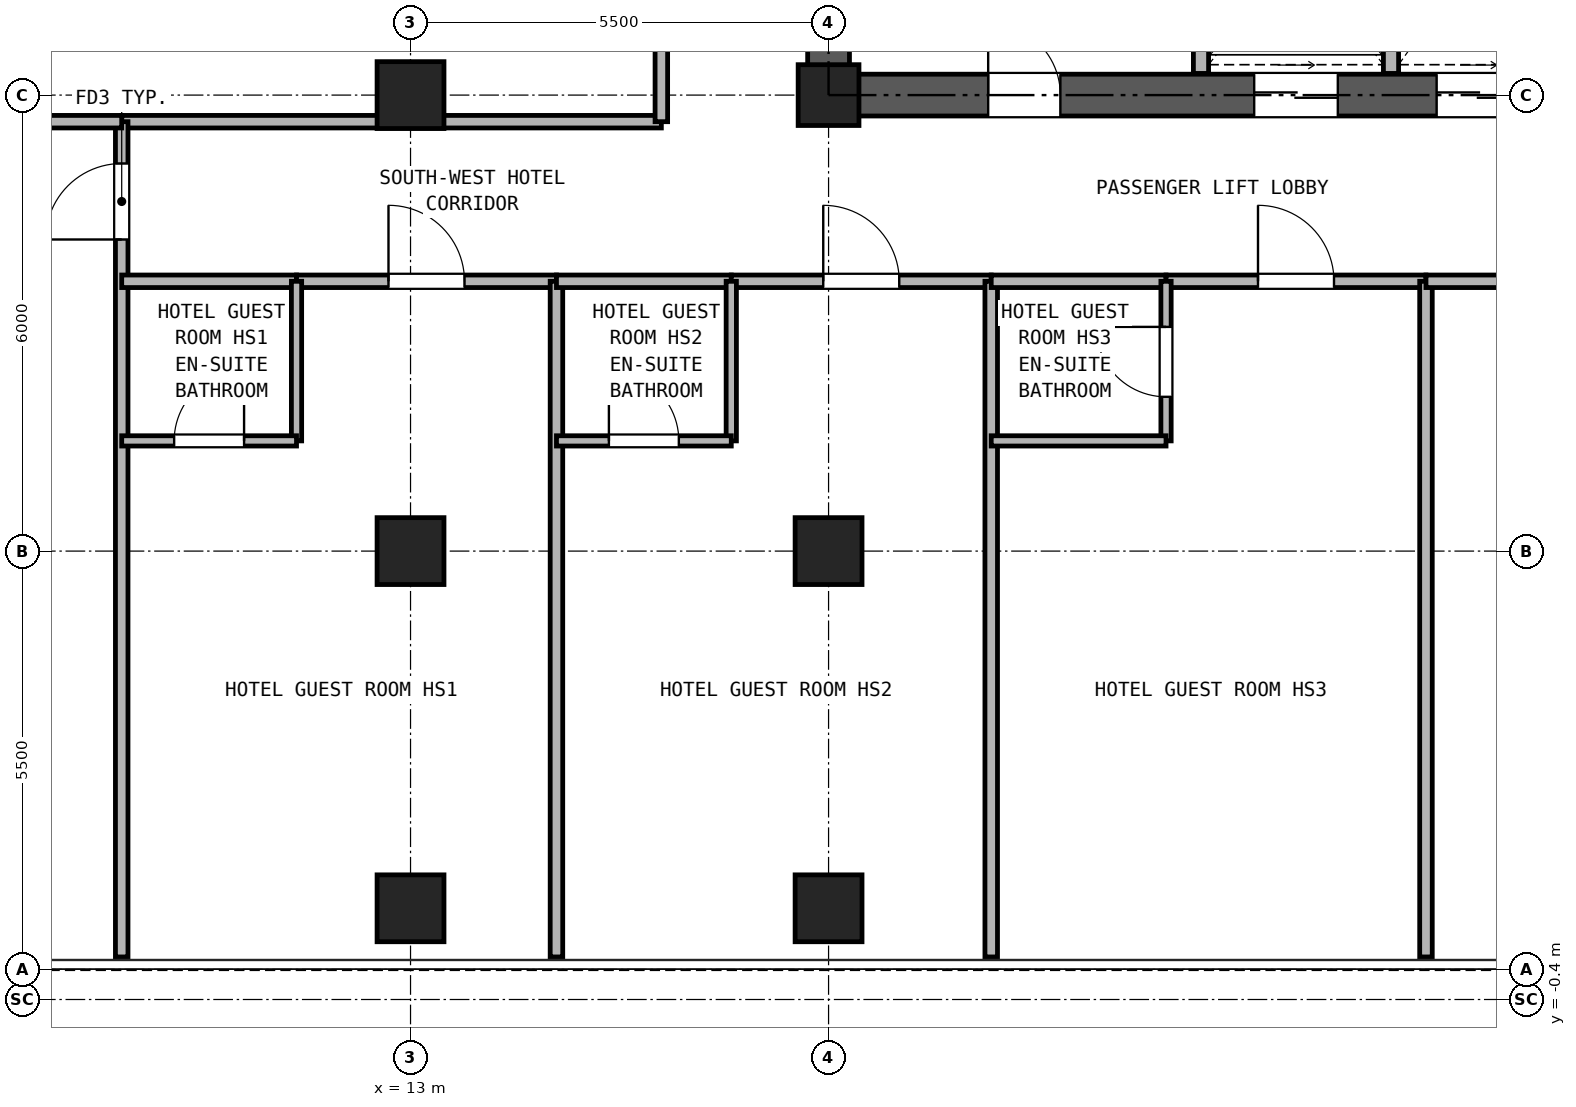
"""IFC4 building model, lengths in metres.
Left out: names, types, materials, properties, quantities, classifications, styles, units other than length and angle.
Written with IfcOpenShell. Run it as: python <this file> out.ifc"""

import sys

from ifc_helpers import new_model, si_unit, direction, frame, frame_2d, origin, origin_2d, place, context, subcontext, project, spatial, rectangle, hollow_rectangle, extrude, source, transform, mapped, element, fill, save


model = new_model("IFC4")
c1 = context("Model", 3, precision=1e-05, world=origin(), true_north=direction((0.0, 1.0)))
c2 = subcontext(c1, "Body", "Model", "MODEL_VIEW")
j1 = project(units=[si_unit("LENGTHUNIT", "METRE"), si_unit("PLANEANGLEUNIT", "RADIAN")], contexts=[c1])
p1 = place(None, origin())
s1 = spatial("IfcSite", under=j1, at=p1, CompositionType="ELEMENT")
p2 = place(p1, origin())
s2 = spatial("IfcBuilding", under=s1, at=p2, CompositionType="ELEMENT")
p3 = place(p2, frame((0.0, 0.0, 102.3)))
s3 = spatial("IfcBuildingStorey", under=s2, at=p3, CompositionType="ELEMENT", Elevation=102.3)
m1 = source(origin(), c2, "Body", "SweptSolid", [
    extrude(hollow_rectangle(XDim=0.88, YDim=0.88, WallThickness=0.05, at=origin_2d()), origin(), (0.0, 0.0, 1.0), 2.95),
])
for number, where, z_axis, x_axis in (
    (1, (13.0, 0.8, 0.0), (0.0, 0.0, 1.0), (1.0, 0.0, 0.0)),
    (2, (18.5, 0.8, 0.0), (0.0, 0.0, 1.0), (1.0, 0.0, 0.0)),
    (3, (13.0, 5.5, 0.0), (0.0, 0.0, 1.0), (1.0, 0.0, 0.0)),
    (4, (13.0, 11.5, 0.0), (0.0, 0.0, 1.0), (1.0, 0.0, 0.0)),
    (5, (18.5, 5.5, 0.0), (0.0, 0.0, 1.0), (1.0, 0.0, 0.0)),
):
    element("IfcColumn", number, at=place(p3, frame(where, z_axis=z_axis, x_axis=x_axis)), inside=s3, PredefinedType="COLUMN", context=c2, shape_type="MappedRepresentation", body=[
        mapped(m1, transform((0.0, 0.0, 0.0), x_axis=(1.0, 0.0, 0.0), y_axis=(0.0, 1.0, 0.0), z_axis=(0.0, 0.0, 1.0), scale=1.0)),
    ])
m2 = source(origin(), c2, "Body", "SweptSolid", [
    extrude(hollow_rectangle(XDim=0.8, YDim=0.8, WallThickness=0.045, at=origin_2d()), origin(), (0.0, 0.0, 1.0), 2.95),
])
p4 = place(p3, frame((18.5, 11.5, 0.0), z_axis=(0.0, 0.0, 1.0), x_axis=(1.0, 0.0, 0.0)))
e6 = element("IfcColumn", 6, at=p4, inside=s3, PredefinedType="COLUMN", context=c2, shape_type="MappedRepresentation", body=[
    mapped(m2, transform((0.0, 0.0, 0.0), x_axis=(1.0, 0.0, 0.0), y_axis=(0.0, 1.0, 0.0), z_axis=(0.0, 0.0, 1.0), scale=1.0)),
])
p5 = place(p3, frame((18.225, 11.5, 0.0), z_axis=(0.0, 0.0, 1.0), x_axis=(1.0, 0.0, 0.0)))
e7 = element("IfcWall", 7, at=p5, inside=s3, PredefinedType="SHEAR", context=c2, shape_type="SweptSolid", body=[
    extrude(rectangle(XDim=10.55, YDim=0.55, at=frame_2d((5.275, 0.0))), origin(), (0.0, 0.0, 1.0), 2.95),
])
p6 = place(p5, frame((2.375, 0.0, 0.0)))
e8 = element("IfcOpeningElement", 8, at=p6, cuts=e7, PredefinedType="OPENING", context=c2, shape_type="SweptSolid", body=[
    extrude(rectangle(XDim=0.95, YDim=2.15, at=frame_2d((0.475, 1.075))), frame((0.0, 0.285, 0.0), z_axis=(0.0, -1.0, 0.0), x_axis=(1.0, 0.0, 0.0)), (0.0, 0.0, 1.0), 0.57),
])
p7 = place(p5, frame((5.875, 0.0, 0.0)))
e9 = element("IfcOpeningElement", 9, at=p7, cuts=e7, PredefinedType="OPENING", context=c2, shape_type="SweptSolid", body=[
    extrude(rectangle(XDim=1.1, YDim=2.25, at=frame_2d((0.55, 1.125))), frame((0.0, 0.285, 0.0), z_axis=(0.0, -1.0, 0.0), x_axis=(1.0, 0.0, 0.0)), (0.0, 0.0, 1.0), 0.57),
])
p8 = place(p5, frame((8.275, 0.0, 0.0)))
e10 = element("IfcOpeningElement", 10, at=p8, cuts=e7, PredefinedType="OPENING", context=c2, shape_type="SweptSolid", body=[
    extrude(rectangle(XDim=1.1, YDim=2.25, at=frame_2d((0.55, 1.125))), frame((0.0, 0.285, 0.0), z_axis=(0.0, -1.0, 0.0), x_axis=(1.0, 0.0, 0.0)), (0.0, 0.0, 1.0), 0.57),
])
p9 = place(p3, frame((18.5, 11.775, 0.0), z_axis=(0.0, 0.0, 1.0), x_axis=(0.0, 1.0, 0.0)))
e11 = element("IfcWall", 11, at=p9, inside=s3, PredefinedType="SHEAR", context=c2, shape_type="SweptSolid", body=[
    extrude(rectangle(XDim=16.7, YDim=0.55, at=frame_2d((8.35, 0.0))), origin(), (0.0, 0.0, 1.0), 2.95),
])
p10 = place(p9, frame((7.375, 0.0, 0.0)))
e12 = element("IfcOpeningElement", 12, at=p10, cuts=e11, PredefinedType="OPENING", context=c2, shape_type="SweptSolid", body=[
    extrude(rectangle(XDim=1.15, YDim=2.2, at=frame_2d((0.575, 1.1))), frame((0.0, 0.285, 0.0), z_axis=(0.0, -1.0, 0.0), x_axis=(1.0, 0.0, 0.0)), (0.0, 0.0, 1.0), 0.57),
])
for number, where, z_axis, x_axis in (
    (13, (23.4, 11.785, 0.0), (0.0, 0.0, 1.0), (0.0, 1.0, 0.0)),
    (14, (25.9, 11.785, 0.0), (0.0, 0.0, 1.0), (0.0, 1.0, 0.0)),
):
    element("IfcWall", number, at=place(p3, frame(where, z_axis=z_axis, x_axis=x_axis)), inside=s3, PredefinedType="PARTITIONING", context=c2, shape_type="SweptSolid", body=[
        extrude(rectangle(XDim=3.215, YDim=0.2, at=frame_2d((1.607, 0.0))), origin(), (0.0, 0.0, 1.0), 2.95),
    ])
p11 = place(p3, frame((9.2, 11.15, 0.0), z_axis=(0.0, 0.0, 1.0), x_axis=(1.0, 0.0, 0.0)))
e15 = element("IfcWall", 15, at=p11, inside=s3, PredefinedType="PARTITIONING", context=c2, shape_type="SweptSolid", body=[
    extrude(rectangle(XDim=7.1, YDim=0.165, at=frame_2d((3.55, 0.0))), origin(), (0.0, 0.0, 1.0), 2.95),
])
p12 = place(p3, frame((16.3, 11.15, 0.0), z_axis=(0.0, 0.0, 1.0), x_axis=(0.0, 1.0, 0.0)))
e16 = element("IfcWall", 16, at=p12, inside=s3, PredefinedType="PARTITIONING", context=c2, shape_type="SweptSolid", body=[
    extrude(rectangle(XDim=18.6, YDim=0.165, at=frame_2d((9.3, 0.0))), origin(), (0.0, 0.0, 1.0), 2.95),
])
p13 = place(p12, frame((8.8, 0.0, 0.0)))
e17 = element("IfcOpeningElement", 17, at=p13, cuts=e16, PredefinedType="OPENING", context=c2, shape_type="SweptSolid", body=[
    extrude(rectangle(XDim=0.95, YDim=2.15, at=frame_2d((0.475, 1.075))), frame((0.0, 0.093, 0.0), z_axis=(0.0, -1.0, 0.0), x_axis=(1.0, 0.0, 0.0)), (0.0, 0.0, 1.0), 0.185),
])
p14 = place(p3, frame((9.2, 0.16, 0.0), z_axis=(0.0, 0.0, 1.0), x_axis=(0.0, 1.0, 0.0)))
e18 = element("IfcWall", 18, at=p14, inside=s3, PredefinedType="PARTITIONING", context=c2, shape_type="SweptSolid", body=[
    extrude(rectangle(XDim=10.99, YDim=0.165, at=frame_2d((5.495, 0.0))), origin(), (0.0, 0.0, 1.0), 2.95),
])
p15 = place(p14, frame((9.44, 0.0, 0.0)))
e19 = element("IfcOpeningElement", 19, at=p15, cuts=e18, PredefinedType="OPENING", context=c2, shape_type="SweptSolid", body=[
    extrude(rectangle(XDim=1.0, YDim=2.15, at=frame_2d((0.5, 1.075))), frame((0.0, 0.093, 0.0), z_axis=(0.0, -1.0, 0.0), x_axis=(1.0, 0.0, 0.0)), (0.0, 0.0, 1.0), 0.185),
])
p16 = place(p3, frame((0.16, 11.15, 0.0), z_axis=(0.0, 0.0, 1.0), x_axis=(1.0, 0.0, 0.0)))
e20 = element("IfcWall", 20, at=p16, inside=s3, PredefinedType="PARTITIONING", context=c2, shape_type="SweptSolid", body=[
    extrude(rectangle(XDim=9.04, YDim=0.165, at=frame_2d((4.52, 0.0))), origin(), (0.0, 0.0, 1.0), 2.95),
])
p17 = place(p3, frame((9.2, 9.05, 0.0), z_axis=(0.0, 0.0, 1.0), x_axis=(1.0, 0.0, 0.0)))
e21 = element("IfcWall", 21, at=p17, inside=s3, PredefinedType="PARTITIONING", context=c2, shape_type="SweptSolid", body=[
    extrude(rectangle(XDim=2.3, YDim=0.165, at=frame_2d((1.15, 0.0))), origin(), (0.0, 0.0, 1.0), 2.95),
])
p18 = place(p3, frame((11.5, 9.05, 0.0), z_axis=(0.0, 0.0, 1.0), x_axis=(1.0, 0.0, 0.0)))
e22 = element("IfcWall", 22, at=p18, inside=s3, PredefinedType="PARTITIONING", context=c2, shape_type="SweptSolid", body=[
    extrude(rectangle(XDim=3.42, YDim=0.165, at=frame_2d((1.71, 0.0))), origin(), (0.0, 0.0, 1.0), 2.95),
])
p19 = place(p18, frame((1.21, 0.0, 0.0)))
e23 = element("IfcOpeningElement", 23, at=p19, cuts=e22, PredefinedType="OPENING", context=c2, shape_type="SweptSolid", body=[
    extrude(rectangle(XDim=1.0, YDim=2.15, at=frame_2d((0.5, 1.075))), frame((0.0, 0.093, 0.0), z_axis=(0.0, -1.0, 0.0), x_axis=(1.0, 0.0, 0.0)), (0.0, 0.0, 1.0), 0.185),
])
p20 = place(p3, frame((11.5, 6.95, 0.0), z_axis=(0.0, 0.0, 1.0), x_axis=(0.0, 1.0, 0.0)))
e24 = element("IfcWall", 24, at=p20, inside=s3, PredefinedType="PARTITIONING", context=c2, shape_type="SweptSolid", body=[
    extrude(rectangle(XDim=2.1, YDim=0.135, at=frame_2d((1.05, 0.0))), origin(), (0.0, 0.0, 1.0), 2.95),
])
p21 = place(p3, frame((9.2, 6.95, 0.0), z_axis=(0.0, 0.0, 1.0), x_axis=(1.0, 0.0, 0.0)))
e25 = element("IfcWall", 25, at=p21, inside=s3, PredefinedType="PARTITIONING", context=c2, shape_type="SweptSolid", body=[
    extrude(rectangle(XDim=2.3, YDim=0.135, at=frame_2d((1.15, 0.0))), origin(), (0.0, 0.0, 1.0), 2.95),
])
p22 = place(p21, frame((0.69, 0.0, 0.0)))
e26 = element("IfcOpeningElement", 26, at=p22, cuts=e25, PredefinedType="OPENING", context=c2, shape_type="SweptSolid", body=[
    extrude(rectangle(XDim=0.92, YDim=2.1, at=frame_2d((0.46, 1.05))), frame((0.0, 0.077, 0.0), z_axis=(0.0, -1.0, 0.0), x_axis=(1.0, 0.0, 0.0)), (0.0, 0.0, 1.0), 0.155),
])
p23 = place(p3, frame((14.92, 0.16, 0.0), z_axis=(0.0, 0.0, 1.0), x_axis=(0.0, 1.0, 0.0)))
e27 = element("IfcWall", 27, at=p23, inside=s3, PredefinedType="PARTITIONING", context=c2, shape_type="SweptSolid", body=[
    extrude(rectangle(XDim=8.89, YDim=0.165, at=frame_2d((4.445, 0.0))), origin(), (0.0, 0.0, 1.0), 2.95),
])
p24 = place(p3, frame((14.92, 9.05, 0.0), z_axis=(0.0, 0.0, 1.0), x_axis=(1.0, 0.0, 0.0)))
e28 = element("IfcWall", 28, at=p24, inside=s3, PredefinedType="PARTITIONING", context=c2, shape_type="SweptSolid", body=[
    extrude(rectangle(XDim=2.3, YDim=0.165, at=frame_2d((1.15, 0.0))), origin(), (0.0, 0.0, 1.0), 2.95),
])
p25 = place(p3, frame((17.22, 9.05, 0.0), z_axis=(0.0, 0.0, 1.0), x_axis=(1.0, 0.0, 0.0)))
e29 = element("IfcWall", 29, at=p25, inside=s3, PredefinedType="PARTITIONING", context=c2, shape_type="SweptSolid", body=[
    extrude(rectangle(XDim=3.42, YDim=0.165, at=frame_2d((1.71, 0.0))), origin(), (0.0, 0.0, 1.0), 2.95),
])
p26 = place(p25, frame((1.21, 0.0, 0.0)))
e30 = element("IfcOpeningElement", 30, at=p26, cuts=e29, PredefinedType="OPENING", context=c2, shape_type="SweptSolid", body=[
    extrude(rectangle(XDim=1.0, YDim=2.15, at=frame_2d((0.5, 1.075))), frame((0.0, 0.093, 0.0), z_axis=(0.0, -1.0, 0.0), x_axis=(1.0, 0.0, 0.0)), (0.0, 0.0, 1.0), 0.185),
])
p27 = place(p3, frame((17.22, 6.95, 0.0), z_axis=(0.0, 0.0, 1.0), x_axis=(0.0, 1.0, 0.0)))
e31 = element("IfcWall", 31, at=p27, inside=s3, PredefinedType="PARTITIONING", context=c2, shape_type="SweptSolid", body=[
    extrude(rectangle(XDim=2.1, YDim=0.135, at=frame_2d((1.05, 0.0))), origin(), (0.0, 0.0, 1.0), 2.95),
])
p28 = place(p3, frame((14.92, 6.95, 0.0), z_axis=(0.0, 0.0, 1.0), x_axis=(1.0, 0.0, 0.0)))
e32 = element("IfcWall", 32, at=p28, inside=s3, PredefinedType="PARTITIONING", context=c2, shape_type="SweptSolid", body=[
    extrude(rectangle(XDim=2.3, YDim=0.135, at=frame_2d((1.15, 0.0))), origin(), (0.0, 0.0, 1.0), 2.95),
])
p29 = place(p28, frame((0.69, 0.0, 0.0)))
e33 = element("IfcOpeningElement", 33, at=p29, cuts=e32, PredefinedType="OPENING", context=c2, shape_type="SweptSolid", body=[
    extrude(rectangle(XDim=0.92, YDim=2.1, at=frame_2d((0.46, 1.05))), frame((0.0, 0.077, 0.0), z_axis=(0.0, -1.0, 0.0), x_axis=(1.0, 0.0, 0.0)), (0.0, 0.0, 1.0), 0.155),
])
p30 = place(p3, frame((20.64, 0.16, 0.0), z_axis=(0.0, 0.0, 1.0), x_axis=(0.0, 1.0, 0.0)))
e34 = element("IfcWall", 34, at=p30, inside=s3, PredefinedType="PARTITIONING", context=c2, shape_type="SweptSolid", body=[
    extrude(rectangle(XDim=8.89, YDim=0.165, at=frame_2d((4.445, 0.0))), origin(), (0.0, 0.0, 1.0), 2.95),
])
p31 = place(p3, frame((20.64, 9.05, 0.0), z_axis=(0.0, 0.0, 1.0), x_axis=(1.0, 0.0, 0.0)))
e35 = element("IfcWall", 35, at=p31, inside=s3, PredefinedType="PARTITIONING", context=c2, shape_type="SweptSolid", body=[
    extrude(rectangle(XDim=2.3, YDim=0.165, at=frame_2d((1.15, 0.0))), origin(), (0.0, 0.0, 1.0), 2.95),
])
p32 = place(p3, frame((22.94, 9.05, 0.0), z_axis=(0.0, 0.0, 1.0), x_axis=(1.0, 0.0, 0.0)))
e36 = element("IfcWall", 36, at=p32, inside=s3, PredefinedType="PARTITIONING", context=c2, shape_type="SweptSolid", body=[
    extrude(rectangle(XDim=3.42, YDim=0.165, at=frame_2d((1.71, 0.0))), origin(), (0.0, 0.0, 1.0), 2.95),
])
p33 = place(p32, frame((1.21, 0.0, 0.0)))
e37 = element("IfcOpeningElement", 37, at=p33, cuts=e36, PredefinedType="OPENING", context=c2, shape_type="SweptSolid", body=[
    extrude(rectangle(XDim=1.0, YDim=2.15, at=frame_2d((0.5, 1.075))), frame((0.0, 0.093, 0.0), z_axis=(0.0, -1.0, 0.0), x_axis=(1.0, 0.0, 0.0)), (0.0, 0.0, 1.0), 0.185),
])
p34 = place(p3, frame((22.94, 6.95, 0.0), z_axis=(0.0, 0.0, 1.0), x_axis=(0.0, 1.0, 0.0)))
e38 = element("IfcWall", 38, at=p34, inside=s3, PredefinedType="PARTITIONING", context=c2, shape_type="SweptSolid", body=[
    extrude(rectangle(XDim=2.1, YDim=0.135, at=frame_2d((1.05, 0.0))), origin(), (0.0, 0.0, 1.0), 2.95),
])
p35 = place(p34, frame((0.58, 0.0, 0.0)))
e39 = element("IfcOpeningElement", 39, at=p35, cuts=e38, PredefinedType="OPENING", context=c2, shape_type="SweptSolid", body=[
    extrude(rectangle(XDim=0.92, YDim=2.1, at=frame_2d((0.46, 1.05))), frame((0.0, 0.077, 0.0), z_axis=(0.0, -1.0, 0.0), x_axis=(1.0, 0.0, 0.0)), (0.0, 0.0, 1.0), 0.155),
])
p36 = place(p3, frame((20.64, 6.95, 0.0), z_axis=(0.0, 0.0, 1.0), x_axis=(1.0, 0.0, 0.0)))
e40 = element("IfcWall", 40, at=p36, inside=s3, PredefinedType="PARTITIONING", context=c2, shape_type="SweptSolid", body=[
    extrude(rectangle(XDim=2.3, YDim=0.135, at=frame_2d((1.15, 0.0))), origin(), (0.0, 0.0, 1.0), 2.95),
])
p37 = place(p3, frame((26.36, 0.16, 0.0), z_axis=(0.0, 0.0, 1.0), x_axis=(0.0, 1.0, 0.0)))
e41 = element("IfcWall", 41, at=p37, inside=s3, PredefinedType="PARTITIONING", context=c2, shape_type="SweptSolid", body=[
    extrude(rectangle(XDim=8.89, YDim=0.165, at=frame_2d((4.445, 0.0))), origin(), (0.0, 0.0, 1.0), 2.95),
])
p38 = place(p3, frame((26.36, 9.05, 0.0), z_axis=(0.0, 0.0, 1.0), x_axis=(1.0, 0.0, 0.0)))
e42 = element("IfcWall", 42, at=p38, inside=s3, PredefinedType="PARTITIONING", context=c2, shape_type="SweptSolid", body=[
    extrude(rectangle(XDim=3.42, YDim=0.165, at=frame_2d((1.71, 0.0))), origin(), (0.0, 0.0, 1.0), 2.95),
])
p39 = place(p38, frame((1.21, 0.0, 0.0)))
e43 = element("IfcOpeningElement", 43, at=p39, cuts=e42, PredefinedType="OPENING", context=c2, shape_type="SweptSolid", body=[
    extrude(rectangle(XDim=1.0, YDim=2.15, at=frame_2d((0.5, 1.075))), frame((0.0, 0.093, 0.0), z_axis=(0.0, -1.0, 0.0), x_axis=(1.0, 0.0, 0.0)), (0.0, 0.0, 1.0), 0.185),
])
p40 = place(p6, frame((0.95, 0.0, 0.0), z_axis=(0.0, 0.0, 1.0), x_axis=(-1.0, 0.0, 0.0)))
e44 = element("IfcDoor", 44, at=p40, inside=s3, OperationType="SINGLE_SWING_LEFT", PredefinedType="DOOR", context=c2, shape_type="SweptSolid", body=[
    extrude(rectangle(XDim=0.95, YDim=2.15, at=frame_2d((0.475, 1.075))), frame((0.0, 0.025, 0.0), z_axis=(0.0, -1.0, 0.0), x_axis=(1.0, 0.0, 0.0)), (0.0, 0.0, 1.0), 0.05),
])
fill(e8, e44)
p41 = place(p7, frame((1.1, 0.0, 0.0), z_axis=(0.0, 0.0, 1.0), x_axis=(-1.0, 0.0, 0.0)))
e45 = element("IfcDoor", 45, at=p41, inside=s3, OperationType="DOUBLE_DOOR_SLIDING", PredefinedType="DOOR", context=c2, shape_type="SweptSolid", body=[
    extrude(rectangle(XDim=1.1, YDim=2.25, at=frame_2d((0.55, 1.125))), frame((0.0, 0.025, 0.0), z_axis=(0.0, -1.0, 0.0), x_axis=(1.0, 0.0, 0.0)), (0.0, 0.0, 1.0), 0.05),
])
fill(e9, e45)
p42 = place(p8, frame((1.1, 0.0, 0.0), z_axis=(0.0, 0.0, 1.0), x_axis=(-1.0, 0.0, 0.0)))
e46 = element("IfcDoor", 46, at=p42, inside=s3, OperationType="DOUBLE_DOOR_SLIDING", PredefinedType="DOOR", context=c2, shape_type="SweptSolid", body=[
    extrude(rectangle(XDim=1.1, YDim=2.25, at=frame_2d((0.55, 1.125))), frame((0.0, 0.025, 0.0), z_axis=(0.0, -1.0, 0.0), x_axis=(1.0, 0.0, 0.0)), (0.0, 0.0, 1.0), 0.05),
])
fill(e10, e46)
p43 = place(p15, origin())
e47 = element("IfcDoor", 47, at=p43, inside=s3, OperationType="SINGLE_SWING_LEFT", PredefinedType="DOOR", context=c2, shape_type="SweptSolid", body=[
    extrude(rectangle(XDim=1.0, YDim=2.15, at=frame_2d((0.5, 1.075))), frame((0.0, 0.025, 0.0), z_axis=(0.0, -1.0, 0.0), x_axis=(1.0, 0.0, 0.0)), (0.0, 0.0, 1.0), 0.05),
])
fill(e19, e47)
p44 = place(p22, origin())
e48 = element("IfcDoor", 48, at=p44, inside=s3, OperationType="SINGLE_SWING_RIGHT", PredefinedType="DOOR", context=c2, shape_type="SweptSolid", body=[
    extrude(rectangle(XDim=0.92, YDim=2.1, at=frame_2d((0.46, 1.05))), frame((0.0, 0.025, 0.0), z_axis=(0.0, -1.0, 0.0), x_axis=(1.0, 0.0, 0.0)), (0.0, 0.0, 1.0), 0.05),
])
fill(e26, e48)
p45 = place(p19, frame((1.0, 0.0, 0.0), z_axis=(0.0, 0.0, 1.0), x_axis=(-1.0, 0.0, 0.0)))
e49 = element("IfcDoor", 49, at=p45, inside=s3, OperationType="SINGLE_SWING_LEFT", PredefinedType="DOOR", context=c2, shape_type="SweptSolid", body=[
    extrude(rectangle(XDim=1.0, YDim=2.15, at=frame_2d((0.5, 1.075))), frame((0.0, 0.025, 0.0), z_axis=(0.0, -1.0, 0.0), x_axis=(1.0, 0.0, 0.0)), (0.0, 0.0, 1.0), 0.05),
])
fill(e23, e49)
p46 = place(p29, origin())
e50 = element("IfcDoor", 50, at=p46, inside=s3, OperationType="SINGLE_SWING_LEFT", PredefinedType="DOOR", context=c2, shape_type="SweptSolid", body=[
    extrude(rectangle(XDim=0.92, YDim=2.1, at=frame_2d((0.46, 1.05))), frame((0.0, 0.025, 0.0), z_axis=(0.0, -1.0, 0.0), x_axis=(1.0, 0.0, 0.0)), (0.0, 0.0, 1.0), 0.05),
])
fill(e33, e50)
p47 = place(p26, frame((1.0, 0.0, 0.0), z_axis=(0.0, 0.0, 1.0), x_axis=(-1.0, 0.0, 0.0)))
e51 = element("IfcDoor", 51, at=p47, inside=s3, OperationType="SINGLE_SWING_LEFT", PredefinedType="DOOR", context=c2, shape_type="SweptSolid", body=[
    extrude(rectangle(XDim=1.0, YDim=2.15, at=frame_2d((0.5, 1.075))), frame((0.0, 0.025, 0.0), z_axis=(0.0, -1.0, 0.0), x_axis=(1.0, 0.0, 0.0)), (0.0, 0.0, 1.0), 0.05),
])
fill(e30, e51)
p48 = place(p35, frame((0.92, 0.0, 0.0), z_axis=(0.0, 0.0, 1.0), x_axis=(-1.0, 0.0, 0.0)))
e52 = element("IfcDoor", 52, at=p48, inside=s3, OperationType="SINGLE_SWING_RIGHT", PredefinedType="DOOR", context=c2, shape_type="SweptSolid", body=[
    extrude(rectangle(XDim=0.92, YDim=2.1, at=frame_2d((0.46, 1.05))), frame((0.0, 0.025, 0.0), z_axis=(0.0, -1.0, 0.0), x_axis=(1.0, 0.0, 0.0)), (0.0, 0.0, 1.0), 0.05),
])
fill(e39, e52)
p49 = place(p33, frame((1.0, 0.0, 0.0), z_axis=(0.0, 0.0, 1.0), x_axis=(-1.0, 0.0, 0.0)))
e53 = element("IfcDoor", 53, at=p49, inside=s3, OperationType="SINGLE_SWING_LEFT", PredefinedType="DOOR", context=c2, shape_type="SweptSolid", body=[
    extrude(rectangle(XDim=1.0, YDim=2.15, at=frame_2d((0.5, 1.075))), frame((0.0, 0.025, 0.0), z_axis=(0.0, -1.0, 0.0), x_axis=(1.0, 0.0, 0.0)), (0.0, 0.0, 1.0), 0.05),
])
fill(e37, e53)
save(model, sys.argv[1])
